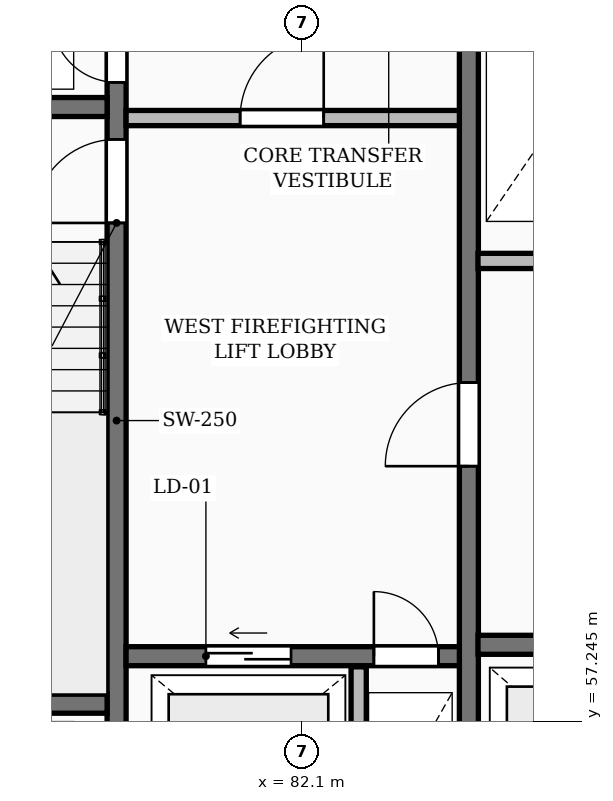
"""IFC4 building model, lengths in metres.
Left out: names, types, materials, properties, quantities, classifications, styles, units other than length and angle.
Written with IfcOpenShell. Run it as: python <this file> out.ifc"""

import sys

from ifc_helpers import new_model, si_unit, direction, frame, frame_2d, origin, place, context, subcontext, project, spatial, rectangle, extrude, element, fill, save


model = new_model("IFC4")
c1 = context("Model", 3, precision=1e-05, world=origin(), true_north=direction((0.0, 1.0)))
c2 = subcontext(c1, "Body", "Model", "MODEL_VIEW")
j1 = project(units=[si_unit("LENGTHUNIT", "METRE"), si_unit("PLANEANGLEUNIT", "RADIAN")], contexts=[c1])
p1 = place(None, origin())
s1 = spatial("IfcSite", under=j1, at=p1, CompositionType="ELEMENT")
p2 = place(p1, origin())
s2 = spatial("IfcBuilding", under=s1, at=p2, CompositionType="ELEMENT")
p3 = place(p2, frame((0.0, 0.0, 80.8)))
s3 = spatial("IfcBuildingStorey", under=s2, at=p3, CompositionType="ELEMENT", Elevation=80.8)
p4 = place(p3, frame((79.665, 55.4, 0.0), z_axis=(0.0, 0.0, 1.0), x_axis=(0.0, 1.0, 0.0)))
e1 = element("IfcWall", 1, at=p4, inside=s3, PredefinedType="SHEAR", context=c2, shape_type="SweptSolid", body=[
    extrude(rectangle(XDim=11.6, YDim=0.25, at=frame_2d((5.8, 0.0))), origin(), (0.0, 0.0, 1.0), 3.25),
])
p5 = place(p4, frame((0.55, 0.0, 0.0)))
e2 = element("IfcOpeningElement", 2, at=p5, cuts=e1, PredefinedType="OPENING", context=c2, shape_type="SweptSolid", body=[
    extrude(rectangle(XDim=0.85, YDim=2.05, at=frame_2d((0.425, 1.025))), frame((0.0, 0.135, 0.0), z_axis=(0.0, -1.0, 0.0), x_axis=(1.0, 0.0, 0.0)), (0.0, 0.0, 1.0), 0.27),
])
p6 = place(p4, frame((8.4, 0.0, 0.0)))
e3 = element("IfcOpeningElement", 3, at=p6, cuts=e1, PredefinedType="OPENING", context=c2, shape_type="SweptSolid", body=[
    extrude(rectangle(XDim=1.1, YDim=2.1, at=frame_2d((0.55, 1.05))), frame((0.0, 0.135, 0.0), z_axis=(0.0, -1.0, 0.0), x_axis=(1.0, 0.0, 0.0)), (0.0, 0.0, 1.0), 0.27),
])
p7 = place(p4, frame((10.25, 0.0, 0.0)))
e4 = element("IfcOpeningElement", 4, at=p7, cuts=e1, PredefinedType="OPENING", context=c2, shape_type="SweptSolid", body=[
    extrude(rectangle(XDim=0.85, YDim=2.05, at=frame_2d((0.425, 1.025))), frame((0.0, 0.135, 0.0), z_axis=(0.0, -1.0, 0.0), x_axis=(1.0, 0.0, 0.0)), (0.0, 0.0, 1.0), 0.27),
])
for number, where, z_axis, x_axis in (
    (5, (76.3, 57.475, 0.0), (0.0, 0.0, 1.0), (1.0, 0.0, 0.0)),
    (6, (76.3, 65.325, 0.0), (0.0, 0.0, 1.0), (1.0, 0.0, 0.0)),
):
    element("IfcWall", number, at=place(p3, frame(where, z_axis=z_axis, x_axis=x_axis)), inside=s3, PredefinedType="SHEAR", context=c2, shape_type="SweptSolid", body=[
        extrude(rectangle(XDim=3.24, YDim=0.25, at=frame_2d((1.62, 0.0))), origin(), (0.0, 0.0, 1.0), 3.25),
    ])
p8 = place(p3, frame((79.79, 58.1, 0.0), z_axis=(0.0, 0.0, 1.0), x_axis=(1.0, 0.0, 0.0)))
e7 = element("IfcWall", 7, at=p8, inside=s3, PredefinedType="SHEAR", context=c2, shape_type="SweptSolid", body=[
    extrude(rectangle(XDim=4.39, YDim=0.25, at=frame_2d((2.195, 0.0))), origin(), (0.0, 0.0, 1.0), 3.25),
])
p9 = place(p8, frame((1.05, 0.0, 0.0)))
e8 = element("IfcOpeningElement", 8, at=p9, cuts=e7, PredefinedType="OPENING", context=c2, shape_type="SweptSolid", body=[
    extrude(rectangle(XDim=1.12, YDim=2.12, at=frame_2d((0.56, 1.06))), frame((0.0, 0.135, 0.0), z_axis=(0.0, -1.0, 0.0), x_axis=(1.0, 0.0, 0.0)), (0.0, 0.0, 1.0), 0.27),
])
p10 = place(p8, frame((3.26, 0.0, 0.0)))
e9 = element("IfcOpeningElement", 9, at=p10, cuts=e7, PredefinedType="OPENING", context=c2, shape_type="SweptSolid", body=[
    extrude(rectangle(XDim=0.85, YDim=2.05, at=frame_2d((0.425, 1.025))), frame((0.0, 0.135, 0.0), z_axis=(0.0, -1.0, 0.0), x_axis=(1.0, 0.0, 0.0)), (0.0, 0.0, 1.0), 0.27),
])
p11 = place(p3, frame((82.85, 55.4, 0.0), z_axis=(0.0, 0.0, 1.0), x_axis=(0.0, 1.0, 0.0)))
e10 = element("IfcWall", 10, at=p11, inside=s3, PredefinedType="PARTITIONING", context=c2, shape_type="SweptSolid", body=[
    extrude(rectangle(XDim=2.56, YDim=0.2, at=frame_2d((1.28, 0.0))), origin(), (0.0, 0.0, 1.0), 2.97),
])
p12 = place(p3, frame((79.79, 65.18, 0.0), z_axis=(0.0, 0.0, 1.0), x_axis=(1.0, 0.0, 0.0)))
e11 = element("IfcWall", 11, at=p12, inside=s3, PredefinedType="PARTITIONING", context=c2, shape_type="SweptSolid", body=[
    extrude(rectangle(XDim=4.39, YDim=0.2, at=frame_2d((2.195, 0.0))), origin(), (0.0, 0.0, 1.0), 2.97),
])
p13 = place(p12, frame((1.5, 0.0, 0.0)))
e12 = element("IfcOpeningElement", 12, at=p13, cuts=e11, PredefinedType="OPENING", context=c2, shape_type="SweptSolid", body=[
    extrude(rectangle(XDim=1.1, YDim=2.1, at=frame_2d((0.55, 1.05))), frame((0.0, 0.11, 0.0), z_axis=(0.0, -1.0, 0.0), x_axis=(1.0, 0.0, 0.0)), (0.0, 0.0, 1.0), 0.22),
])
p14 = place(p3, frame((84.3, 55.4, 0.0), z_axis=(0.0, 0.0, 1.0), x_axis=(0.0, 1.0, 0.0)))
e13 = element("IfcWall", 13, at=p14, inside=s3, PredefinedType="SHEAR", context=c2, shape_type="SweptSolid", body=[
    extrude(rectangle(XDim=11.6, YDim=0.25, at=frame_2d((5.8, 0.0))), origin(), (0.0, 0.0, 1.0), 3.25),
])
p15 = place(p14, frame((5.2, 0.0, 0.0)))
e14 = element("IfcOpeningElement", 14, at=p15, cuts=e13, PredefinedType="OPENING", context=c2, shape_type="SweptSolid", body=[
    extrude(rectangle(XDim=1.1, YDim=2.1, at=frame_2d((0.55, 1.05))), frame((0.0, 0.135, 0.0), z_axis=(0.0, -1.0, 0.0), x_axis=(1.0, 0.0, 0.0)), (0.0, 0.0, 1.0), 0.27),
])
p16 = place(p3, frame((84.42, 58.25, 0.0), z_axis=(0.0, 0.0, 1.0), x_axis=(1.0, 0.0, 0.0)))
e15 = element("IfcWall", 15, at=p16, inside=s3, PredefinedType="SHEAR", context=c2, shape_type="SweptSolid", body=[
    extrude(rectangle(XDim=8.36, YDim=0.25, at=frame_2d((4.18, 0.0))), origin(), (0.0, 0.0, 1.0), 3.25),
])
p17 = place(p16, frame((0.82, 0.0, 0.0)))
e16 = element("IfcOpeningElement", 16, at=p17, cuts=e15, PredefinedType="OPENING", context=c2, shape_type="SweptSolid", body=[
    extrude(rectangle(XDim=1.12, YDim=2.12, at=frame_2d((0.56, 1.06))), frame((0.0, 0.135, 0.0), z_axis=(0.0, -1.0, 0.0), x_axis=(1.0, 0.0, 0.0)), (0.0, 0.0, 1.0), 0.27),
])
p18 = place(p16, frame((3.62, 0.0, 0.0)))
e17 = element("IfcOpeningElement", 17, at=p18, cuts=e15, PredefinedType="OPENING", context=c2, shape_type="SweptSolid", body=[
    extrude(rectangle(XDim=1.12, YDim=2.12, at=frame_2d((0.56, 1.06))), frame((0.0, 0.135, 0.0), z_axis=(0.0, -1.0, 0.0), x_axis=(1.0, 0.0, 0.0)), (0.0, 0.0, 1.0), 0.27),
])
p19 = place(p16, frame((6.42, 0.0, 0.0)))
e18 = element("IfcOpeningElement", 18, at=p19, cuts=e15, PredefinedType="OPENING", context=c2, shape_type="SweptSolid", body=[
    extrude(rectangle(XDim=1.12, YDim=2.12, at=frame_2d((0.56, 1.06))), frame((0.0, 0.135, 0.0), z_axis=(0.0, -1.0, 0.0), x_axis=(1.0, 0.0, 0.0)), (0.0, 0.0, 1.0), 0.27),
])
p20 = place(p3, frame((84.42, 63.3, 0.0), z_axis=(0.0, 0.0, 1.0), x_axis=(1.0, 0.0, 0.0)))
e19 = element("IfcWall", 19, at=p20, inside=s3, PredefinedType="PARTITIONING", context=c2, shape_type="SweptSolid", body=[
    extrude(rectangle(XDim=19.83, YDim=0.2, at=frame_2d((9.915, 0.0))), origin(), (0.0, 0.0, 1.0), 2.97),
])
p21 = place(p20, frame((1.15, 0.0, 0.0)))
e20 = element("IfcOpeningElement", 20, at=p21, cuts=e19, PredefinedType="OPENING", context=c2, shape_type="SweptSolid", body=[
    extrude(rectangle(XDim=0.85, YDim=2.05, at=frame_2d((0.425, 1.025))), frame((0.0, 0.11, 0.0), z_axis=(0.0, -1.0, 0.0), x_axis=(1.0, 0.0, 0.0)), (0.0, 0.0, 1.0), 0.22),
])
p22 = place(p20, frame((3.25, 0.0, 0.0)))
e21 = element("IfcOpeningElement", 21, at=p22, cuts=e19, PredefinedType="OPENING", context=c2, shape_type="SweptSolid", body=[
    extrude(rectangle(XDim=0.85, YDim=2.05, at=frame_2d((0.425, 1.025))), frame((0.0, 0.11, 0.0), z_axis=(0.0, -1.0, 0.0), x_axis=(1.0, 0.0, 0.0)), (0.0, 0.0, 1.0), 0.22),
])
p23 = place(p20, frame((13.08, 0.0, 0.0)))
e22 = element("IfcOpeningElement", 22, at=p23, cuts=e19, PredefinedType="OPENING", context=c2, shape_type="SweptSolid", body=[
    extrude(rectangle(XDim=1.5, YDim=2.2, at=frame_2d((0.75, 1.1))), frame((0.0, 0.11, 0.0), z_axis=(0.0, -1.0, 0.0), x_axis=(1.0, 0.0, 0.0)), (0.0, 0.0, 1.0), 0.22),
])
p24 = place(p20, frame((5.53, 0.0, 0.0)))
e23 = element("IfcOpeningElement", 23, at=p24, cuts=e19, PredefinedType="OPENING", context=c2, shape_type="SweptSolid", body=[
    extrude(rectangle(XDim=0.88, YDim=2.06, at=frame_2d((0.44, 1.03))), frame((0.0, 0.11, 0.0), z_axis=(0.0, -1.0, 0.0), x_axis=(1.0, 0.0, 0.0)), (0.0, 0.0, 1.0), 0.22),
])
p25 = place(p20, frame((7.68, 0.0, 0.0)))
e24 = element("IfcOpeningElement", 24, at=p25, cuts=e19, PredefinedType="OPENING", context=c2, shape_type="SweptSolid", body=[
    extrude(rectangle(XDim=0.88, YDim=2.06, at=frame_2d((0.44, 1.03))), frame((0.0, 0.11, 0.0), z_axis=(0.0, -1.0, 0.0), x_axis=(1.0, 0.0, 0.0)), (0.0, 0.0, 1.0), 0.22),
])
p26 = place(p20, frame((10.43, 0.0, 0.0)))
e25 = element("IfcOpeningElement", 25, at=p26, cuts=e19, PredefinedType="OPENING", context=c2, shape_type="SweptSolid", body=[
    extrude(rectangle(XDim=0.85, YDim=2.05, at=frame_2d((0.425, 1.025))), frame((0.0, 0.11, 0.0), z_axis=(0.0, -1.0, 0.0), x_axis=(1.0, 0.0, 0.0)), (0.0, 0.0, 1.0), 0.22),
])
p27 = place(p20, frame((16.23, 0.0, 0.0)))
e26 = element("IfcOpeningElement", 26, at=p27, cuts=e19, PredefinedType="OPENING", context=c2, shape_type="SweptSolid", body=[
    extrude(rectangle(XDim=0.96, YDim=2.1, at=frame_2d((0.48, 1.05))), frame((0.0, 0.11, 0.0), z_axis=(0.0, -1.0, 0.0), x_axis=(1.0, 0.0, 0.0)), (0.0, 0.0, 1.0), 0.22),
])
p28 = place(p20, frame((18.68, 0.0, 0.0)))
e27 = element("IfcOpeningElement", 27, at=p28, cuts=e19, PredefinedType="OPENING", context=c2, shape_type="SweptSolid", body=[
    extrude(rectangle(XDim=0.84, YDim=2.04, at=frame_2d((0.42, 1.02))), frame((0.0, 0.11, 0.0), z_axis=(0.0, -1.0, 0.0), x_axis=(1.0, 0.0, 0.0)), (0.0, 0.0, 1.0), 0.22),
])
p29 = place(p6, origin())
e28 = element("IfcDoor", 28, at=p29, inside=s3, OperationType="SINGLE_SWING_LEFT", PredefinedType="DOOR", context=c2, shape_type="SweptSolid", body=[
    extrude(rectangle(XDim=1.1, YDim=2.1, at=frame_2d((0.55, 1.05))), frame((0.0, 0.025, 0.0), z_axis=(0.0, -1.0, 0.0), x_axis=(1.0, 0.0, 0.0)), (0.0, 0.0, 1.0), 0.05),
])
fill(e3, e28)
p30 = place(p7, origin())
e29 = element("IfcDoor", 29, at=p30, inside=s3, OperationType="SINGLE_SWING_RIGHT", PredefinedType="DOOR", context=c2, shape_type="SweptSolid", body=[
    extrude(rectangle(XDim=0.85, YDim=2.05, at=frame_2d((0.425, 1.025))), frame((0.0, 0.025, 0.0), z_axis=(0.0, -1.0, 0.0), x_axis=(1.0, 0.0, 0.0)), (0.0, 0.0, 1.0), 0.05),
])
fill(e4, e29)
p31 = place(p9, origin())
e30 = element("IfcDoor", 30, at=p31, inside=s3, OperationType="SLIDING_TO_LEFT", PredefinedType="DOOR", context=c2, shape_type="SweptSolid", body=[
    extrude(rectangle(XDim=1.12, YDim=2.12, at=frame_2d((0.56, 1.06))), frame((0.0, 0.025, 0.0), z_axis=(0.0, -1.0, 0.0), x_axis=(1.0, 0.0, 0.0)), (0.0, 0.0, 1.0), 0.05),
])
fill(e8, e30)
p32 = place(p10, origin())
e31 = element("IfcDoor", 31, at=p32, inside=s3, OperationType="SINGLE_SWING_LEFT", PredefinedType="DOOR", context=c2, shape_type="SweptSolid", body=[
    extrude(rectangle(XDim=0.85, YDim=2.05, at=frame_2d((0.425, 1.025))), frame((0.0, 0.025, 0.0), z_axis=(0.0, -1.0, 0.0), x_axis=(1.0, 0.0, 0.0)), (0.0, 0.0, 1.0), 0.05),
])
fill(e9, e31)
p33 = place(p13, origin())
e32 = element("IfcDoor", 32, at=p33, inside=s3, OperationType="SINGLE_SWING_RIGHT", PredefinedType="DOOR", context=c2, shape_type="SweptSolid", body=[
    extrude(rectangle(XDim=1.1, YDim=2.1, at=frame_2d((0.55, 1.05))), frame((0.0, 0.025, 0.0), z_axis=(0.0, -1.0, 0.0), x_axis=(1.0, 0.0, 0.0)), (0.0, 0.0, 1.0), 0.05),
])
fill(e12, e32)
p34 = place(p15, origin())
e33 = element("IfcDoor", 33, at=p34, inside=s3, OperationType="SINGLE_SWING_LEFT", PredefinedType="DOOR", context=c2, shape_type="SweptSolid", body=[
    extrude(rectangle(XDim=1.1, YDim=2.1, at=frame_2d((0.55, 1.05))), frame((0.0, 0.025, 0.0), z_axis=(0.0, -1.0, 0.0), x_axis=(1.0, 0.0, 0.0)), (0.0, 0.0, 1.0), 0.05),
])
fill(e14, e33)
save(model, sys.argv[1])
